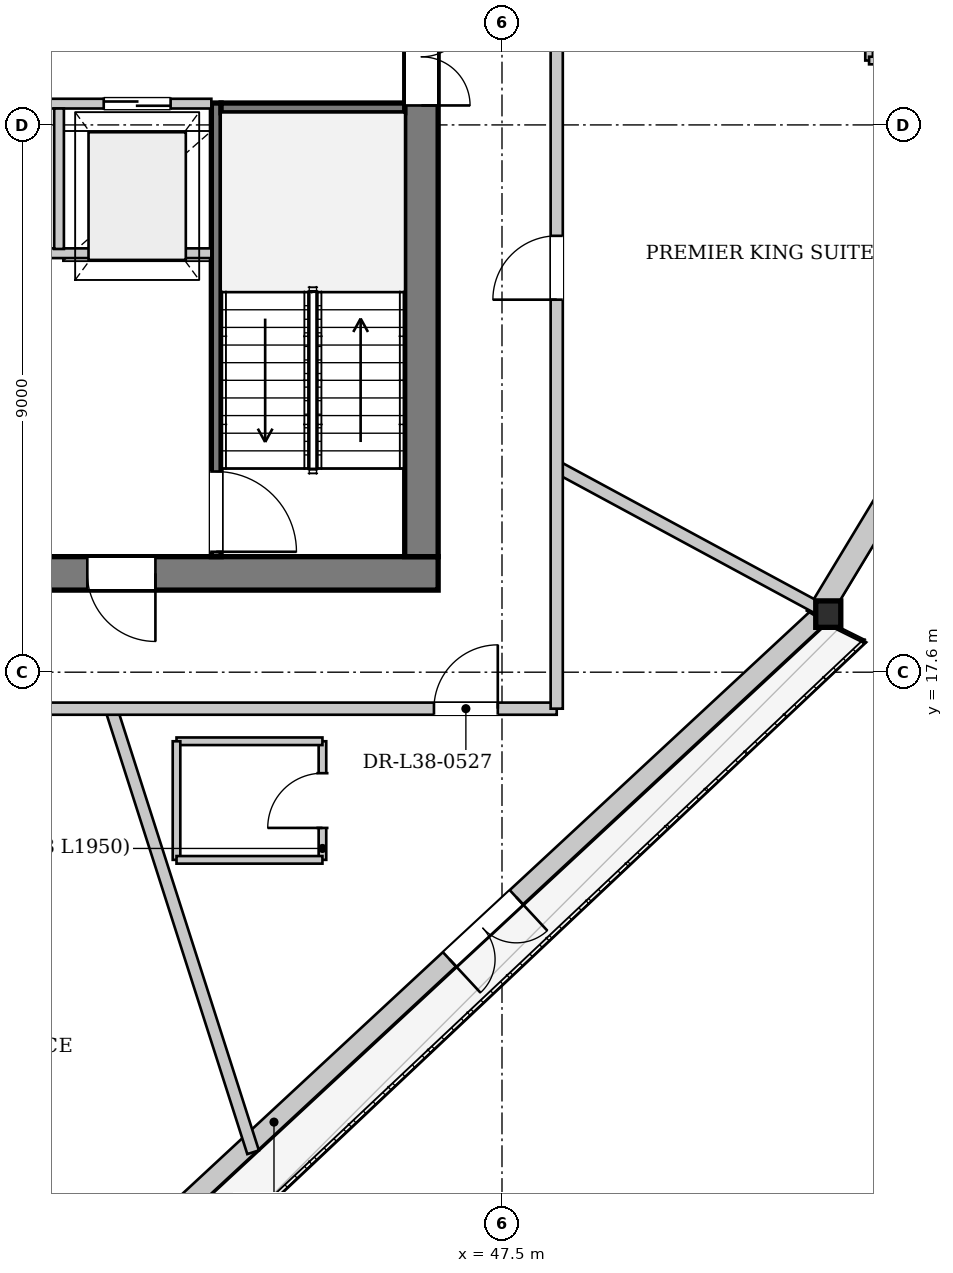
"""IFC4 building model, lengths in metres.
Left out: names, types, materials, properties, quantities, classifications, styles, units other than length and angle.
Written with IfcOpenShell. Run it as: python <this file> out.ifc"""

import sys

from ifc_helpers import new_model, si_unit, direction, frame, frame_2d, origin, origin_2d, place, context, subcontext, project, spatial, rectangle, i_section, extrude, source, transform, mapped, element, fill, save


model = new_model("IFC4")
c1 = context("Model", 3, precision=1e-05, world=origin(), true_north=direction((0.0, 1.0)))
c2 = subcontext(c1, "Body", "Model", "MODEL_VIEW")
j1 = project(units=[si_unit("LENGTHUNIT", "METRE"), si_unit("PLANEANGLEUNIT", "RADIAN")], contexts=[c1])
p1 = place(None, origin())
s1 = spatial("IfcSite", under=j1, at=p1, CompositionType="ELEMENT")
p2 = place(p1, origin())
s2 = spatial("IfcBuilding", under=s1, at=p2, CompositionType="ELEMENT")
p3 = place(p2, frame((0.0, 0.0, 146.6)))
s3 = spatial("IfcBuildingStorey", under=s2, at=p3, CompositionType="ELEMENT", Elevation=146.6)
m1 = source(origin(), c2, "Body", "SweptSolid", [
    extrude(i_section(OverallWidth=0.412, OverallDepth=0.435, WebThickness=0.031, FlangeThickness=0.05, at=origin_2d()), origin(), (0.0, 0.0, 1.0), 3.397),
])
p4 = place(p3, frame((52.839, 18.415, 0.0), z_axis=(0.016098414869, 0.082648112052, 0.996448759652), x_axis=(-0.981553147676, 0.191189482678, 0.0)))
e1 = element("IfcColumn", 1, at=p4, inside=s3, PredefinedType="COLUMN", context=c2, shape_type="MappedRepresentation", body=[
    mapped(m1, transform((0.0, 0.0, 0.0), x_axis=(1.0, 0.0, 0.0), y_axis=(0.0, 1.0, 0.0), z_axis=(0.0, 0.0, 1.0), scale=1.0)),
])
p5 = place(p3, frame((52.73, 18.532, 0.0), z_axis=(0.0, 0.0, 1.0), x_axis=(-0.73309626957, -0.680124885255, 0.0)))
e2 = element("IfcWall", 2, at=p5, inside=s3, PredefinedType="SOLIDWALL", context=c2, shape_type="SweptSolid", body=[
    extrude(rectangle(XDim=23.63, YDim=0.32, at=frame_2d((11.815, 0.0))), origin(), (0.0, 0.0, 1.0), 2.692),
])
p6 = place(p5, frame((6.812, 0.0, 0.0)))
e3 = element("IfcOpeningElement", 3, at=p6, cuts=e2, PredefinedType="OPENING", context=c2, shape_type="SweptSolid", body=[
    extrude(rectangle(XDim=1.5, YDim=2.3, at=frame_2d((0.75, 1.15))), frame((0.0, 0.17, 0.0), z_axis=(0.0, -1.0, 0.0), x_axis=(1.0, 0.0, 0.0)), (0.0, 0.0, 1.0), 0.34),
])
p7 = place(p5, frame((16.186, 0.0, 0.25)))
e4 = element("IfcOpeningElement", 4, at=p7, cuts=e2, PredefinedType="OPENING", context=c2, shape_type="SweptSolid", body=[
    extrude(rectangle(XDim=2.6, YDim=2.35, at=frame_2d((1.3, 1.175))), frame((0.0, 0.17, 0.0), z_axis=(0.0, -1.0, 0.0), x_axis=(1.0, 0.0, 0.0)), (0.0, 0.0, 1.0), 0.34),
])
p8 = place(p3, frame((64.901, 38.735, 0.0), z_axis=(0.0, 0.0, 1.0), x_axis=(-0.517346318523, -0.855776131188, 0.0)))
e5 = element("IfcWall", 5, at=p8, inside=s3, PredefinedType="SOLIDWALL", context=c2, shape_type="SweptSolid", body=[
    extrude(rectangle(XDim=23.63, YDim=0.38, at=frame_2d((11.815, 0.0))), origin(), (0.0, 0.0, 1.0), 2.692),
])
p9 = place(p8, frame((4.416, 0.0, 0.322)))
e6 = element("IfcOpeningElement", 6, at=p9, cuts=e5, PredefinedType="OPENING", context=c2, shape_type="SweptSolid", body=[
    extrude(rectangle(XDim=2.2, YDim=2.25, at=frame_2d((1.1, 1.125))), frame((0.0, 0.2, 0.0), z_axis=(0.0, -1.0, 0.0), x_axis=(1.0, 0.0, 0.0)), (0.0, 0.0, 1.0), 0.4),
])
p10 = place(p8, frame((15.914, 0.0, 0.322)))
e7 = element("IfcOpeningElement", 7, at=p10, cuts=e5, PredefinedType="OPENING", context=c2, shape_type="SweptSolid", body=[
    extrude(rectangle(XDim=2.2, YDim=2.25, at=frame_2d((1.1, 1.125))), frame((0.0, 0.2, 0.0), z_axis=(0.0, -1.0, 0.0), x_axis=(1.0, 0.0, 0.0)), (0.0, 0.0, 1.0), 0.4),
])
p11 = place(p3, frame((46.45, 19.225, 0.0), z_axis=(0.0, 0.0, 1.0), x_axis=(-1.0, 0.0, 0.0)))
e8 = element("IfcWall", 8, at=p11, inside=s3, PredefinedType="SHEAR", context=c2, shape_type="SweptSolid", body=[
    extrude(rectangle(XDim=16.9, YDim=0.55, at=frame_2d((8.45, 0.0))), origin(), (0.0, 0.0, 1.0), 3.3),
])
p12 = place(p11, frame((4.65, 0.0, 0.0)))
e9 = element("IfcOpeningElement", 9, at=p12, cuts=e8, PredefinedType="OPENING", context=c2, shape_type="SweptSolid", body=[
    extrude(rectangle(XDim=1.12, YDim=2.25, at=frame_2d((0.56, 1.125))), frame((0.0, 0.285, 0.0), z_axis=(0.0, -1.0, 0.0), x_axis=(1.0, 0.0, 0.0)), (0.0, 0.0, 1.0), 0.57),
])
p13 = place(p11, frame((11.15, 0.0, 0.0)))
e10 = element("IfcOpeningElement", 10, at=p13, cuts=e8, PredefinedType="OPENING", context=c2, shape_type="SweptSolid", body=[
    extrude(rectangle(XDim=1.12, YDim=2.25, at=frame_2d((0.56, 1.125))), frame((0.0, 0.285, 0.0), z_axis=(0.0, -1.0, 0.0), x_axis=(1.0, 0.0, 0.0)), (0.0, 0.0, 1.0), 0.57),
])
p14 = place(p3, frame((46.175, 33.7, 0.0), z_axis=(0.0, 0.0, 1.0), x_axis=(0.0, -1.0, 0.0)))
e11 = element("IfcWall", 11, at=p14, inside=s3, PredefinedType="SHEAR", context=c2, shape_type="SweptSolid", body=[
    extrude(rectangle(XDim=14.2, YDim=0.55, at=frame_2d((7.1, 0.0))), origin(), (0.0, 0.0, 1.0), 3.3),
])
p15 = place(p14, frame((5.18, 0.0, 0.0)))
e12 = element("IfcOpeningElement", 12, at=p15, cuts=e11, PredefinedType="OPENING", context=c2, shape_type="SweptSolid", body=[
    extrude(rectangle(XDim=1.6, YDim=2.2, at=frame_2d((0.8, 1.1))), frame((0.0, 0.285, 0.0), z_axis=(0.0, -1.0, 0.0), x_axis=(1.0, 0.0, 0.0)), (0.0, 0.0, 1.0), 0.57),
])
p16 = place(p14, frame((2.05, 0.0, 0.0)))
e13 = element("IfcOpeningElement", 13, at=p16, cuts=e11, PredefinedType="OPENING", context=c2, shape_type="SweptSolid", body=[
    extrude(rectangle(XDim=0.95, YDim=2.1, at=frame_2d((0.475, 1.05))), frame((0.0, 0.285, 0.0), z_axis=(0.0, -1.0, 0.0), x_axis=(1.0, 0.0, 0.0)), (0.0, 0.0, 1.0), 0.57),
])
p17 = place(p3, frame((42.8, 26.96, 0.0), z_axis=(0.0, 0.0, 1.0), x_axis=(0.0, -1.0, 0.0)))
e14 = element("IfcWall", 14, at=p17, inside=s3, PredefinedType="PARTITIONING", context=c2, shape_type="SweptSolid", body=[
    extrude(rectangle(XDim=7.46, YDim=0.16, at=frame_2d((3.73, 0.0))), origin(), (0.0, 0.0, 1.0), 3.3),
])
p18 = place(p17, frame((6.06, 0.0, 0.0)))
e15 = element("IfcOpeningElement", 15, at=p18, cuts=e14, PredefinedType="OPENING", context=c2, shape_type="SweptSolid", body=[
    extrude(rectangle(XDim=1.32, YDim=2.2, at=frame_2d((0.66, 1.1))), frame((0.0, 0.09, 0.0), z_axis=(0.0, -1.0, 0.0), x_axis=(1.0, 0.0, 0.0)), (0.0, 0.0, 1.0), 0.18),
])
p19 = place(p3, frame((42.88, 26.88, 0.0), z_axis=(0.0, 0.0, 1.0), x_axis=(1.0, 0.0, 0.0)))
e16 = element("IfcWall", 16, at=p19, inside=s3, PredefinedType="PARTITIONING", context=c2, shape_type="SweptSolid", body=[
    extrude(rectangle(XDim=3.02, YDim=0.16, at=frame_2d((1.51, 0.0))), origin(), (0.0, 0.0, 1.0), 3.3),
])
p20 = place(p3, frame((33.28, 24.49, 0.0), z_axis=(0.0, 0.0, 1.0), x_axis=(1.0, 0.0, 0.0)))
e17 = element("IfcWall", 17, at=p20, inside=s3, PredefinedType="PARTITIONING", context=c2, shape_type="SweptSolid", body=[
    extrude(rectangle(XDim=9.44, YDim=0.16, at=frame_2d((4.72, 0.0))), origin(), (0.0, 0.0, 1.0), 3.3),
])
p21 = place(p3, frame((33.28, 26.95, 0.0), z_axis=(0.0, 0.0, 1.0), x_axis=(1.0, 0.0, 0.0)))
e18 = element("IfcWall", 18, at=p21, inside=s3, PredefinedType="PARTITIONING", context=c2, shape_type="SweptSolid", body=[
    extrude(rectangle(XDim=9.44, YDim=0.16, at=frame_2d((4.72, 0.0))), origin(), (0.0, 0.0, 1.0), 3.3),
])
p22 = place(p21, frame((1.2, 0.0, 0.0)))
e19 = element("IfcOpeningElement", 19, at=p22, cuts=e18, PredefinedType="OPENING", context=c2, shape_type="SweptSolid", body=[
    extrude(rectangle(XDim=0.95, YDim=2.1, at=frame_2d((0.475, 1.05))), frame((0.0, 0.09, 0.0), z_axis=(0.0, -1.0, 0.0), x_axis=(1.0, 0.0, 0.0)), (0.0, 0.0, 1.0), 0.18),
])
p23 = place(p21, frame((4.65, 0.0, 0.0)))
e20 = element("IfcOpeningElement", 20, at=p23, cuts=e18, PredefinedType="OPENING", context=c2, shape_type="SweptSolid", body=[
    extrude(rectangle(XDim=0.95, YDim=2.1, at=frame_2d((0.475, 1.05))), frame((0.0, 0.09, 0.0), z_axis=(0.0, -1.0, 0.0), x_axis=(1.0, 0.0, 0.0)), (0.0, 0.0, 1.0), 0.18),
])
p24 = place(p21, frame((7.67, 0.0, 0.0)))
e21 = element("IfcOpeningElement", 21, at=p24, cuts=e18, PredefinedType="OPENING", context=c2, shape_type="SweptSolid", body=[
    extrude(rectangle(XDim=1.1, YDim=2.2, at=frame_2d((0.55, 1.1))), frame((0.0, 0.09, 0.0), z_axis=(0.0, -1.0, 0.0), x_axis=(1.0, 0.0, 0.0)), (0.0, 0.0, 1.0), 0.18),
])
p25 = place(p3, frame((40.215, 24.56, 0.0), z_axis=(0.0, 0.0, 1.0), x_axis=(0.0, 1.0, 0.0)))
e22 = element("IfcWall", 22, at=p25, inside=s3, PredefinedType="PARTITIONING", context=c2, shape_type="SweptSolid", body=[
    extrude(rectangle(XDim=2.31, YDim=0.16, at=frame_2d((1.155, 0.0))), origin(), (0.0, 0.0, 1.0), 3.3),
])
p26 = place(p3, frame((41.072, 17.0, 0.0), z_axis=(0.0, 0.0, 1.0), x_axis=(0.304787292701, -0.952420446131, 0.0)))
e23 = element("IfcWall", 23, at=p26, inside=s3, PredefinedType="PARTITIONING", context=c2, shape_type="SweptSolid", body=[
    extrude(rectangle(XDim=7.659, YDim=0.2, at=frame_2d((3.83, 0.0))), origin(), (0.0, 0.0, 1.0), 3.3),
])
p27 = place(p3, frame((48.4, 20.978, 0.0), z_axis=(0.0, 0.0, 1.0), x_axis=(0.879687571987, -0.475552074638, 0.0)))
e24 = element("IfcWall", 24, at=p27, inside=s3, PredefinedType="PARTITIONING", context=c2, shape_type="SweptSolid", body=[
    extrude(rectangle(XDim=5.101, YDim=0.2, at=frame_2d((2.55, 0.0))), origin(), (0.0, 0.0, 1.0), 2.835),
])
p28 = place(p3, frame((44.547, 14.514, 0.0), z_axis=(0.0, 0.0, 1.0), x_axis=(0.0, 1.0, 0.0)))
e25 = element("IfcWall", 25, at=p28, inside=s3, PredefinedType="PARTITIONING", context=c2, shape_type="SweptSolid", body=[
    extrude(rectangle(XDim=1.95, YDim=0.125, at=frame_2d((0.975, 0.0))), origin(), (0.0, 0.0, 1.0), 3.3),
])
p29 = place(p28, frame((0.525, 0.0, 0.0)))
e26 = element("IfcOpeningElement", 26, at=p29, cuts=e25, PredefinedType="OPENING", context=c2, shape_type="SweptSolid", body=[
    extrude(rectangle(XDim=0.9, YDim=2.1, at=frame_2d((0.45, 1.05))), frame((0.0, 0.073, 0.0), z_axis=(0.0, -1.0, 0.0), x_axis=(1.0, 0.0, 0.0)), (0.0, 0.0, 1.0), 0.145),
])
p30 = place(p3, frame((44.547, 16.464, 0.0), z_axis=(0.0, 0.0, 1.0), x_axis=(-1.0, 0.0, 0.0)))
e27 = element("IfcWall", 27, at=p30, inside=s3, PredefinedType="PARTITIONING", context=c2, shape_type="SweptSolid", body=[
    extrude(rectangle(XDim=2.4, YDim=0.125, at=frame_2d((1.2, 0.0))), origin(), (0.0, 0.0, 1.0), 3.3),
])
p31 = place(p3, frame((42.147, 16.464, 0.0), z_axis=(0.0, 0.0, 1.0), x_axis=(0.0, -1.0, 0.0)))
e28 = element("IfcWall", 28, at=p31, inside=s3, PredefinedType="PARTITIONING", context=c2, shape_type="SweptSolid", body=[
    extrude(rectangle(XDim=1.95, YDim=0.125, at=frame_2d((0.975, 0.0))), origin(), (0.0, 0.0, 1.0), 3.3),
])
for number, where, z_axis, x_axis in (
    (29, (42.147, 14.514, 0.0), (0.0, 0.0, 1.0), (1.0, 0.0, 0.0)),
    (30, (53.537, 30.059, 0.0), (0.0, 0.0, 1.0), (0.0, -1.0, 0.0)),
):
    element("IfcWall", number, at=place(p3, frame(where, z_axis=z_axis, x_axis=x_axis)), inside=s3, PredefinedType="PARTITIONING", context=c2, shape_type="SweptSolid", body=[
        extrude(rectangle(XDim=2.4, YDim=0.125, at=frame_2d((1.2, 0.0))), origin(), (0.0, 0.0, 1.0), 3.3),
    ])
p32 = place(p3, frame((53.537, 27.659, 0.0), z_axis=(0.0, 0.0, 1.0), x_axis=(1.0, 0.0, 0.0)))
e31 = element("IfcWall", 31, at=p32, inside=s3, PredefinedType="PARTITIONING", context=c2, shape_type="SweptSolid", body=[
    extrude(rectangle(XDim=1.95, YDim=0.125, at=frame_2d((0.975, 0.0))), origin(), (0.0, 0.0, 1.0), 3.3),
])
p33 = place(p3, frame((27.6, 17.0, 0.0), z_axis=(0.0, 0.0, 1.0), x_axis=(1.0, 0.0, 0.0)))
e32 = element("IfcWall", 32, at=p33, inside=s3, PredefinedType="PARTITIONING", context=c2, shape_type="SweptSolid", body=[
    extrude(rectangle(XDim=20.8, YDim=0.2, at=frame_2d((10.4, 0.0))), origin(), (0.0, 0.0, 1.0), 3.3),
])
p34 = place(p33, frame((1.56, 0.0, 0.0)))
e33 = element("IfcOpeningElement", 33, at=p34, cuts=e32, PredefinedType="OPENING", context=c2, shape_type="SweptSolid", body=[
    extrude(rectangle(XDim=1.05, YDim=2.2, at=frame_2d((0.525, 1.1))), frame((0.0, 0.11, 0.0), z_axis=(0.0, -1.0, 0.0), x_axis=(1.0, 0.0, 0.0)), (0.0, 0.0, 1.0), 0.22),
])
p35 = place(p33, frame((8.616, 0.0, 0.0)))
e34 = element("IfcOpeningElement", 34, at=p35, cuts=e32, PredefinedType="OPENING", context=c2, shape_type="SweptSolid", body=[
    extrude(rectangle(XDim=1.05, YDim=2.2, at=frame_2d((0.525, 1.1))), frame((0.0, 0.11, 0.0), z_axis=(0.0, -1.0, 0.0), x_axis=(1.0, 0.0, 0.0)), (0.0, 0.0, 1.0), 0.22),
])
p36 = place(p33, frame((18.781, 0.0, 0.0)))
e35 = element("IfcOpeningElement", 35, at=p36, cuts=e32, PredefinedType="OPENING", context=c2, shape_type="SweptSolid", body=[
    extrude(rectangle(XDim=1.05, YDim=2.2, at=frame_2d((0.525, 1.1))), frame((0.0, 0.11, 0.0), z_axis=(0.0, -1.0, 0.0), x_axis=(1.0, 0.0, 0.0)), (0.0, 0.0, 1.0), 0.22),
])
p37 = place(p3, frame((48.4, 17.0, 0.0), z_axis=(0.0, 0.0, 1.0), x_axis=(0.0, 1.0, 0.0)))
e36 = element("IfcWall", 36, at=p37, inside=s3, PredefinedType="PARTITIONING", context=c2, shape_type="SweptSolid", body=[
    extrude(rectangle(XDim=19.2, YDim=0.2, at=frame_2d((9.6, 0.0))), origin(), (0.0, 0.0, 1.0), 3.3),
])
p38 = place(p37, frame((6.726, 0.0, 0.0)))
e37 = element("IfcOpeningElement", 37, at=p38, cuts=e36, PredefinedType="OPENING", context=c2, shape_type="SweptSolid", body=[
    extrude(rectangle(XDim=1.05, YDim=2.2, at=frame_2d((0.525, 1.1))), frame((0.0, 0.11, 0.0), z_axis=(0.0, -1.0, 0.0), x_axis=(1.0, 0.0, 0.0)), (0.0, 0.0, 1.0), 0.22),
])
p39 = place(p37, frame((17.4, 0.0, 0.0)))
e38 = element("IfcOpeningElement", 38, at=p39, cuts=e36, PredefinedType="OPENING", context=c2, shape_type="SweptSolid", body=[
    extrude(rectangle(XDim=1.05, YDim=2.2, at=frame_2d((0.525, 1.1))), frame((0.0, 0.11, 0.0), z_axis=(0.0, -1.0, 0.0), x_axis=(1.0, 0.0, 0.0)), (0.0, 0.0, 1.0), 0.22),
])
m2 = source(origin(), c2, "Body", "SweptSolid", [
    extrude(rectangle(XDim=1.5, YDim=2.3, at=frame_2d((0.75, 1.15))), frame((0.0, 0.025, 0.0), z_axis=(0.0, -1.0, 0.0), x_axis=(1.0, 0.0, 0.0)), (0.0, 0.0, 1.0), 0.05),
])
p40 = place(p6, origin())
e39 = element("IfcDoor", 39, at=p40, inside=s3, OperationType="DOUBLE_DOOR_SINGLE_SWING", PredefinedType="DOOR", context=c2, shape_type="MappedRepresentation", body=[
    mapped(m2, transform((0.0, 0.0, 0.0), x_axis=(1.0, 0.0, 0.0), y_axis=(0.0, 1.0, 0.0), z_axis=(0.0, 0.0, 1.0), scale=1.0)),
])
fill(e3, e39)
m3 = source(origin(), c2, "Body", "SweptSolid", [
    extrude(rectangle(XDim=1.12, YDim=2.25, at=frame_2d((0.56, 1.125))), frame((0.0, 0.025, 0.0), z_axis=(0.0, -1.0, 0.0), x_axis=(1.0, 0.0, 0.0)), (0.0, 0.0, 1.0), 0.05),
])
p41 = place(p12, origin())
e40 = element("IfcDoor", 40, at=p41, inside=s3, OperationType="SINGLE_SWING_LEFT", PredefinedType="DOOR", context=c2, shape_type="MappedRepresentation", body=[
    mapped(m3, transform((0.0, 0.0, 0.0), x_axis=(1.0, 0.0, 0.0), y_axis=(0.0, 1.0, 0.0), z_axis=(0.0, 0.0, 1.0), scale=1.0)),
])
fill(e9, e40)
m4 = source(origin(), c2, "Body", "SweptSolid", [
    extrude(rectangle(XDim=1.6, YDim=2.2, at=frame_2d((0.8, 1.1))), frame((0.0, 0.025, 0.0), z_axis=(0.0, -1.0, 0.0), x_axis=(1.0, 0.0, 0.0)), (0.0, 0.0, 1.0), 0.05),
])
p42 = place(p15, origin())
e41 = element("IfcDoor", 41, at=p42, inside=s3, OperationType="DOUBLE_DOOR_SINGLE_SWING", PredefinedType="DOOR", context=c2, shape_type="MappedRepresentation", body=[
    mapped(m4, transform((0.0, 0.0, 0.0), x_axis=(1.0, 0.0, 0.0), y_axis=(0.0, 1.0, 0.0), z_axis=(0.0, 0.0, 1.0), scale=1.0)),
])
fill(e12, e41)
m5 = source(origin(), c2, "Body", "SweptSolid", [
    extrude(rectangle(XDim=1.32, YDim=2.2, at=frame_2d((0.66, 1.1))), frame((0.0, 0.025, 0.0), z_axis=(0.0, -1.0, 0.0), x_axis=(1.0, 0.0, 0.0)), (0.0, 0.0, 1.0), 0.05),
])
p43 = place(p18, origin())
e42 = element("IfcDoor", 42, at=p43, inside=s3, OperationType="SINGLE_SWING_RIGHT", PredefinedType="DOOR", context=c2, shape_type="MappedRepresentation", body=[
    mapped(m5, transform((0.0, 0.0, 0.0), x_axis=(1.0, 0.0, 0.0), y_axis=(0.0, 1.0, 0.0), z_axis=(0.0, 0.0, 1.0), scale=1.0)),
])
fill(e15, e42)
m6 = source(origin(), c2, "Body", "SweptSolid", [
    extrude(rectangle(XDim=1.1, YDim=2.2, at=frame_2d((0.55, 1.1))), frame((0.0, 0.025, 0.0), z_axis=(0.0, -1.0, 0.0), x_axis=(1.0, 0.0, 0.0)), (0.0, 0.0, 1.0), 0.05),
])
p44 = place(p24, origin())
e43 = element("IfcDoor", 43, at=p44, inside=s3, OperationType="DOUBLE_DOOR_SLIDING", PredefinedType="DOOR", context=c2, shape_type="MappedRepresentation", body=[
    mapped(m6, transform((0.0, 0.0, 0.0), x_axis=(1.0, 0.0, 0.0), y_axis=(0.0, 1.0, 0.0), z_axis=(0.0, 0.0, 1.0), scale=1.0)),
])
fill(e21, e43)
m7 = source(origin(), c2, "Body", "SweptSolid", [
    extrude(rectangle(XDim=0.9, YDim=2.1, at=frame_2d((0.45, 1.05))), frame((0.0, 0.025, 0.0), z_axis=(0.0, -1.0, 0.0), x_axis=(1.0, 0.0, 0.0)), (0.0, 0.0, 1.0), 0.05),
])
p45 = place(p29, origin())
e44 = element("IfcDoor", 44, at=p45, inside=s3, OperationType="SINGLE_SWING_LEFT", PredefinedType="DOOR", context=c2, shape_type="MappedRepresentation", body=[
    mapped(m7, transform((0.0, 0.0, 0.0), x_axis=(1.0, 0.0, 0.0), y_axis=(0.0, 1.0, 0.0), z_axis=(0.0, 0.0, 1.0), scale=1.0)),
])
fill(e26, e44)
m8 = source(origin(), c2, "Body", "SweptSolid", [
    extrude(rectangle(XDim=1.05, YDim=2.2, at=frame_2d((0.525, 1.1))), frame((0.0, 0.025, 0.0), z_axis=(0.0, -1.0, 0.0), x_axis=(1.0, 0.0, 0.0)), (0.0, 0.0, 1.0), 0.05),
])
p46 = place(p36, origin())
e45 = element("IfcDoor", 45, at=p46, inside=s3, OperationType="SINGLE_SWING_RIGHT", PredefinedType="DOOR", context=c2, shape_type="MappedRepresentation", body=[
    mapped(m8, transform((0.0, 0.0, 0.0), x_axis=(1.0, 0.0, 0.0), y_axis=(0.0, 1.0, 0.0), z_axis=(0.0, 0.0, 1.0), scale=1.0)),
])
fill(e35, e45)
p47 = place(p38, origin())
e46 = element("IfcDoor", 46, at=p47, inside=s3, OperationType="SINGLE_SWING_LEFT", PredefinedType="DOOR", context=c2, shape_type="MappedRepresentation", body=[
    mapped(m8, transform((0.0, 0.0, 0.0), x_axis=(1.0, 0.0, 0.0), y_axis=(0.0, 1.0, 0.0), z_axis=(0.0, 0.0, 1.0), scale=1.0)),
])
fill(e37, e46)
save(model, sys.argv[1])
